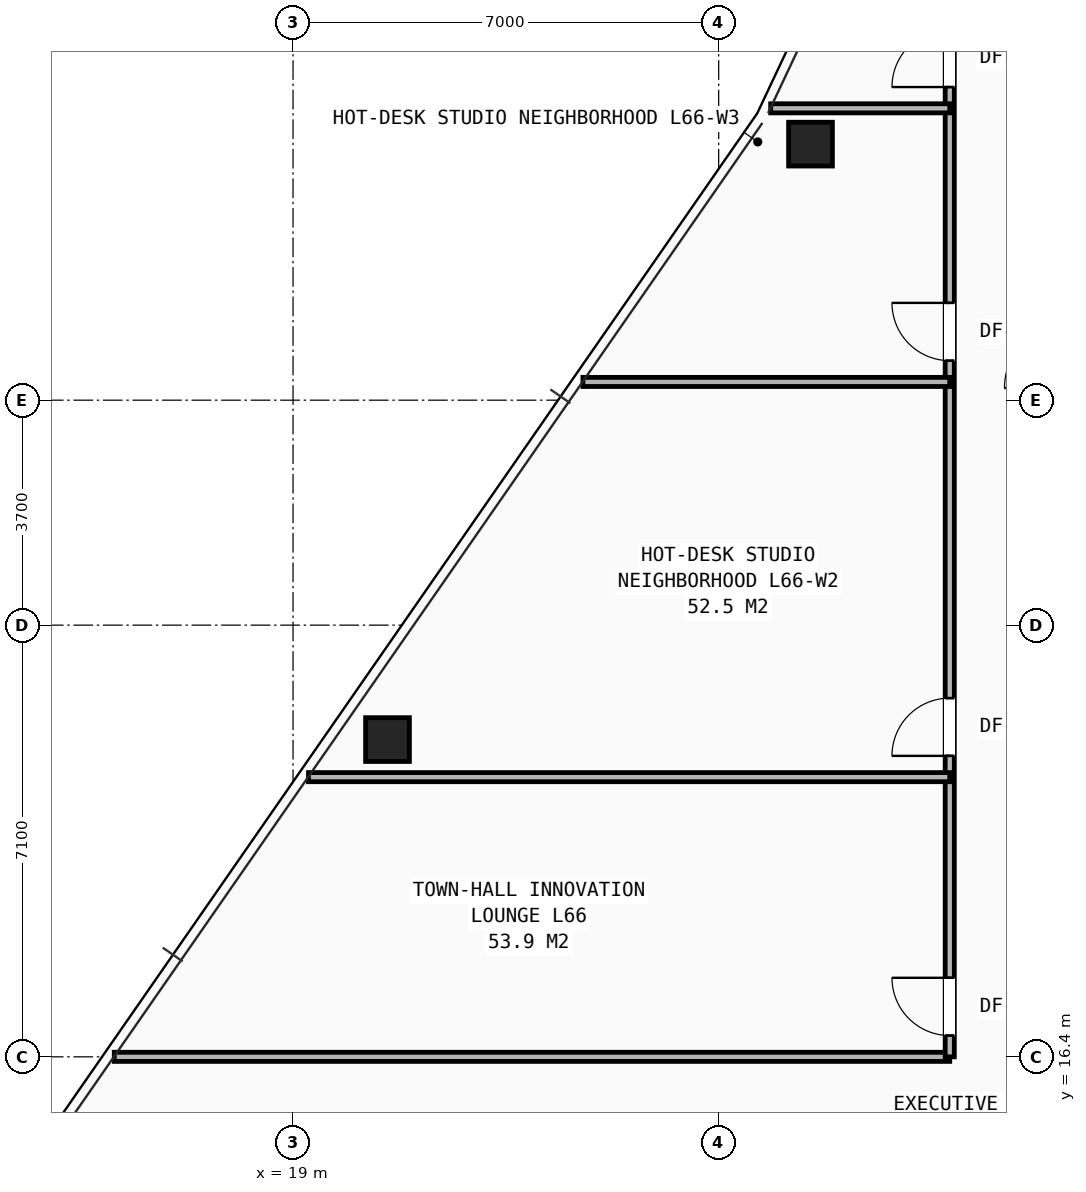
"""IFC4 building model, lengths in metres.
Left out: names, types, materials, properties, quantities, classifications, styles, units other than length and angle.
Written with IfcOpenShell. Run it as: python <this file> out.ifc"""

import sys

from ifc_helpers import new_model, si_unit, direction, frame, frame_2d, origin, origin_2d, place, context, subcontext, project, spatial, rectangle, hollow_rectangle, extrude, element, fill, save


model = new_model("IFC4")
c1 = context("Model", 3, precision=1e-05, world=origin(), true_north=direction((0.0, 1.0)))
c2 = subcontext(c1, "Body", "Model", "MODEL_VIEW")
j1 = project(units=[si_unit("LENGTHUNIT", "METRE"), si_unit("PLANEANGLEUNIT", "RADIAN")], contexts=[c1])
p1 = place(None, origin())
s1 = spatial("IfcSite", under=j1, at=p1, CompositionType="ELEMENT")
p2 = place(p1, origin())
s2 = spatial("IfcBuilding", under=s1, at=p2, CompositionType="ELEMENT")
p3 = place(p2, frame((0.0, 0.0, 232.9)))
s3 = spatial("IfcBuildingStorey", under=s2, at=p3, CompositionType="ELEMENT", Elevation=232.9)
for number, where, z_axis, x_axis in (
    (1, (27.51, 31.411, 0.0), (0.0, 0.0, 1.0), (1.0, 0.0, 0.0)),
    (2, (20.553, 21.618, 0.0), (0.0, 0.0, 1.0), (1.0, 0.0, 0.0)),
):
    element("IfcColumn", number, at=place(p3, frame(where, z_axis=z_axis, x_axis=x_axis)), inside=s3, PredefinedType="COLUMN", context=c2, shape_type="SweptSolid", body=[
        extrude(hollow_rectangle(XDim=0.72, YDim=0.72, WallThickness=0.05, at=origin_2d()), origin(), (0.0, 0.0, 1.0), 3.5),
    ])
p4 = place(p3, frame((16.06, 16.4, 0.0), z_axis=(0.0, 0.0, 1.0), x_axis=(1.0, 0.0, 0.0)))
e3 = element("IfcWall", 3, at=p4, inside=s3, PredefinedType="PARTITIONING", context=c2, shape_type="SweptSolid", body=[
    extrude(rectangle(XDim=13.74, YDim=0.15, at=frame_2d((6.87, 0.0))), origin(), (0.0, 0.0, 1.0), 2.265),
])
p5 = place(p3, frame((29.8, 16.4, 0.0), z_axis=(0.0, 0.0, 1.0), x_axis=(0.0, 1.0, 0.0)))
e4 = element("IfcWall", 4, at=p5, inside=s3, PredefinedType="PARTITIONING", context=c2, shape_type="SweptSolid", body=[
    extrude(rectangle(XDim=19.3, YDim=0.15, at=frame_2d((9.65, 0.0))), origin(), (0.0, 0.0, 1.0), 2.265),
])
p6 = place(p5, frame((0.35, 0.0, 0.0)))
e5 = element("IfcOpeningElement", 5, at=p6, cuts=e4, PredefinedType="OPENING", context=c2, shape_type="SweptSolid", body=[
    extrude(rectangle(XDim=0.95, YDim=2.1, at=frame_2d((0.475, 1.05))), frame((0.0, 0.085, 0.0), z_axis=(0.0, -1.0, 0.0), x_axis=(1.0, 0.0, 0.0)), (0.0, 0.0, 1.0), 0.17),
])
p7 = place(p5, frame((4.95, 0.0, 0.0)))
e6 = element("IfcOpeningElement", 6, at=p7, cuts=e4, PredefinedType="OPENING", context=c2, shape_type="SweptSolid", body=[
    extrude(rectangle(XDim=0.95, YDim=2.1, at=frame_2d((0.475, 1.05))), frame((0.0, 0.085, 0.0), z_axis=(0.0, -1.0, 0.0), x_axis=(1.0, 0.0, 0.0)), (0.0, 0.0, 1.0), 0.17),
])
p8 = place(p5, frame((11.45, 0.0, 0.0)))
e7 = element("IfcOpeningElement", 7, at=p8, cuts=e4, PredefinedType="OPENING", context=c2, shape_type="SweptSolid", body=[
    extrude(rectangle(XDim=0.95, YDim=2.1, at=frame_2d((0.475, 1.05))), frame((0.0, 0.085, 0.0), z_axis=(0.0, -1.0, 0.0), x_axis=(1.0, 0.0, 0.0)), (0.0, 0.0, 1.0), 0.17),
])
p9 = place(p5, frame((15.95, 0.0, 0.0)))
e8 = element("IfcOpeningElement", 8, at=p9, cuts=e4, PredefinedType="OPENING", context=c2, shape_type="SweptSolid", body=[
    extrude(rectangle(XDim=0.95, YDim=2.1, at=frame_2d((0.475, 1.05))), frame((0.0, 0.085, 0.0), z_axis=(0.0, -1.0, 0.0), x_axis=(1.0, 0.0, 0.0)), (0.0, 0.0, 1.0), 0.17),
])
p10 = place(p3, frame((19.254, 21.0, 0.0), z_axis=(0.0, 0.0, 1.0), x_axis=(1.0, 0.0, 0.0)))
e9 = element("IfcWall", 9, at=p10, inside=s3, PredefinedType="PARTITIONING", context=c2, shape_type="SweptSolid", body=[
    extrude(rectangle(XDim=10.546, YDim=0.15, at=frame_2d((5.273, 0.0))), origin(), (0.0, 0.0, 1.0), 2.265),
])
p11 = place(p3, frame((23.767, 27.5, 0.0), z_axis=(0.0, 0.0, 1.0), x_axis=(1.0, 0.0, 0.0)))
e10 = element("IfcWall", 10, at=p11, inside=s3, PredefinedType="PARTITIONING", context=c2, shape_type="SweptSolid", body=[
    extrude(rectangle(XDim=6.033, YDim=0.15, at=frame_2d((3.016, 0.0))), origin(), (0.0, 0.0, 1.0), 2.628),
])
p12 = place(p3, frame((26.855, 32.0, 0.0), z_axis=(0.0, 0.0, 1.0), x_axis=(1.0, 0.0, 0.0)))
e11 = element("IfcWall", 11, at=p12, inside=s3, PredefinedType="PARTITIONING", context=c2, shape_type="SweptSolid", body=[
    extrude(rectangle(XDim=2.945, YDim=0.15, at=frame_2d((1.473, 0.0))), origin(), (0.0, 0.0, 1.0), 2.628),
])
p13 = place(p6, origin())
e12 = element("IfcDoor", 12, at=p13, inside=s3, OperationType="SINGLE_SWING_RIGHT", PredefinedType="DOOR", context=c2, shape_type="SweptSolid", body=[
    extrude(rectangle(XDim=0.95, YDim=2.1, at=frame_2d((0.475, 1.05))), frame((0.0, 0.025, 0.0), z_axis=(0.0, -1.0, 0.0), x_axis=(1.0, 0.0, 0.0)), (0.0, 0.0, 1.0), 0.05),
])
fill(e5, e12)
p14 = place(p7, origin())
e13 = element("IfcDoor", 13, at=p14, inside=s3, OperationType="SINGLE_SWING_LEFT", PredefinedType="DOOR", context=c2, shape_type="SweptSolid", body=[
    extrude(rectangle(XDim=0.95, YDim=2.1, at=frame_2d((0.475, 1.05))), frame((0.0, 0.025, 0.0), z_axis=(0.0, -1.0, 0.0), x_axis=(1.0, 0.0, 0.0)), (0.0, 0.0, 1.0), 0.05),
])
fill(e6, e13)
p15 = place(p8, origin())
e14 = element("IfcDoor", 14, at=p15, inside=s3, OperationType="SINGLE_SWING_RIGHT", PredefinedType="DOOR", context=c2, shape_type="SweptSolid", body=[
    extrude(rectangle(XDim=0.95, YDim=2.1, at=frame_2d((0.475, 1.05))), frame((0.0, 0.025, 0.0), z_axis=(0.0, -1.0, 0.0), x_axis=(1.0, 0.0, 0.0)), (0.0, 0.0, 1.0), 0.05),
])
fill(e7, e14)
p16 = place(p9, origin())
e15 = element("IfcDoor", 15, at=p16, inside=s3, OperationType="SINGLE_SWING_LEFT", PredefinedType="DOOR", context=c2, shape_type="SweptSolid", body=[
    extrude(rectangle(XDim=0.95, YDim=2.1, at=frame_2d((0.475, 1.05))), frame((0.0, 0.025, 0.0), z_axis=(0.0, -1.0, 0.0), x_axis=(1.0, 0.0, 0.0)), (0.0, 0.0, 1.0), 0.05),
])
fill(e8, e15)
save(model, sys.argv[1])
